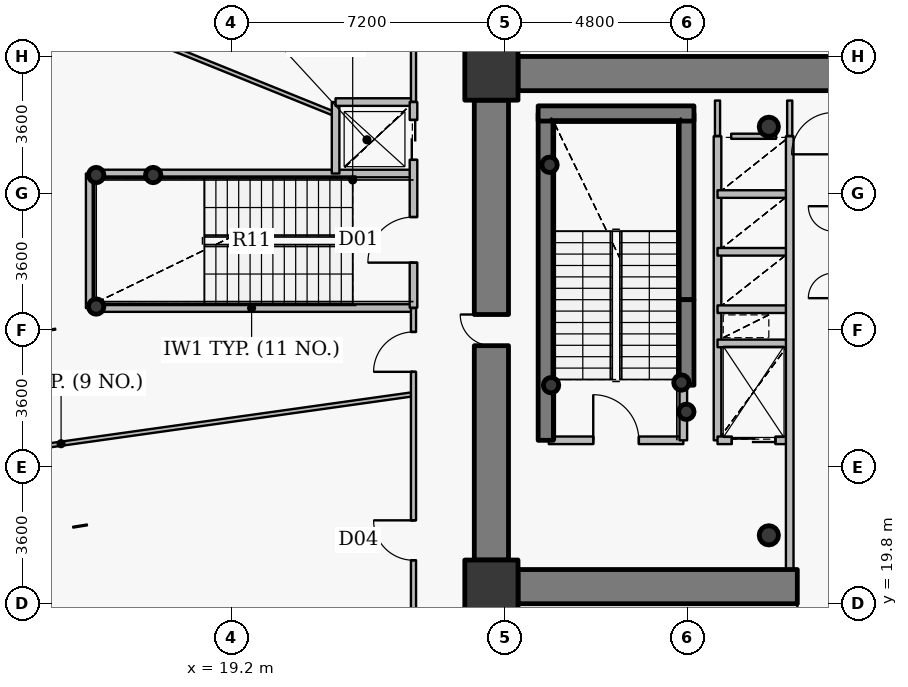
"""IFC4 building model, lengths in metres.
Left out: names, types, materials, properties, quantities, classifications, styles, units other than length and angle.
Written with IfcOpenShell. Run it as: python <this file> out.ifc"""

import sys

from ifc_helpers import new_model, si_unit, direction, frame, frame_2d, origin, origin_2d, place, context, subcontext, project, spatial, rectangle, hollow_circle, extrude, source, transform, mapped, element, fill, save


model = new_model("IFC4")
c1 = context("Model", 3, precision=1e-05, world=origin(), true_north=direction((0.0, 1.0)))
c2 = subcontext(c1, "Body", "Model", "MODEL_VIEW")
j1 = project(units=[si_unit("LENGTHUNIT", "METRE"), si_unit("PLANEANGLEUNIT", "RADIAN")], contexts=[c1])
p1 = place(None, origin())
s1 = spatial("IfcSite", under=j1, at=p1, CompositionType="ELEMENT")
p2 = place(p1, origin())
s2 = spatial("IfcBuilding", under=s1, at=p2, CompositionType="ELEMENT")
p3 = place(p2, frame((0.0, 0.0, 49.2)))
s3 = spatial("IfcBuildingStorey", under=s2, at=p3, CompositionType="ELEMENT", Elevation=49.2)
for number, where, z_axis, x_axis in (
    (1, (26.05, 20.25, 0.0), (0.0, 0.0, 1.0), (1.0, 0.0, 0.0)),
    (2, (26.05, 33.75, 0.0), (0.0, 0.0, 1.0), (1.0, 0.0, 0.0)),
):
    element("IfcColumn", number, at=place(p3, frame(where, z_axis=z_axis, x_axis=x_axis)), inside=s3, PredefinedType="COLUMN", context=c2, shape_type="SweptSolid", body=[
        extrude(rectangle(XDim=1.4, YDim=1.4, at=origin_2d()), origin(), (0.0, 0.0, 1.0), 4.2),
    ])
for number, where, z_axis, x_axis in (
    (3, (33.35, 21.6, 0.0), (0.0, 0.0, 1.0), (1.0, 0.0, 0.0)),
    (4, (33.35, 32.35, 0.0), (0.0, 0.0, 1.0), (1.0, 0.0, 0.0)),
):
    element("IfcColumn", number, at=place(p3, frame(where, z_axis=z_axis, x_axis=x_axis)), inside=s3, PredefinedType="COLUMN", context=c2, shape_type="SweptSolid", body=[
        extrude(hollow_circle(Radius=0.254, WallThickness=0.02, at=origin_2d()), origin(), (0.0, 0.0, 1.0), 4.2),
    ])
p4 = place(p3, frame((27.48, 24.1, 0.0), z_axis=(0.0, 0.0, 1.0), x_axis=(0.0, 1.0, 0.0)))
e5 = element("IfcWall", 5, at=p4, inside=s3, PredefinedType="SHEAR", context=c2, shape_type="SweptSolid", body=[
    extrude(rectangle(XDim=8.6, YDim=0.4, at=frame_2d((4.3, 0.0))), origin(), (0.0, 0.0, 1.0), 4.2),
])
p5 = place(p3, frame((31.18, 27.8, 0.0), z_axis=(0.0, 0.0, 1.0), x_axis=(0.0, 1.0, 0.0)))
e6 = element("IfcWall", 6, at=p5, inside=s3, PredefinedType="SHEAR", context=c2, shape_type="SweptSolid", body=[
    extrude(rectangle(XDim=4.9, YDim=0.4, at=frame_2d((2.45, 0.0))), origin(), (0.0, 0.0, 1.0), 4.2),
])
p6 = place(p3, frame((27.28, 32.7, 0.0), z_axis=(0.0, 0.0, 1.0), x_axis=(1.0, 0.0, 0.0)))
e7 = element("IfcWall", 7, at=p6, inside=s3, PredefinedType="SHEAR", context=c2, shape_type="SweptSolid", body=[
    extrude(rectangle(XDim=4.1, YDim=0.4, at=frame_2d((2.05, 0.0))), origin(), (0.0, 0.0, 1.0), 4.2),
])
for number, where, z_axis, x_axis in (
    (8, (27.58, 31.35, 0.0), (0.0, 0.0, 1.0), (1.0, 0.0, 0.0)),
    (9, (31.05, 25.62, 0.0), (0.0, 0.0, 1.0), (1.0, 0.0, 0.0)),
    (10, (31.18, 24.85, 0.0), (0.0, 0.0, 1.0), (1.0, 0.0, 0.0)),
    (11, (27.62, 25.55, 0.0), (0.0, 0.0, 1.0), (1.0, 0.0, 0.0)),
    (12, (15.65, 27.62, 0.0), (0.0, 0.0, 1.0), (1.0, 0.0, 0.0)),
    (13, (15.65, 31.08, 0.0), (0.0, 0.0, 1.0), (1.0, 0.0, 0.0)),
    (14, (17.15, 31.08, 0.0), (0.0, 0.0, 1.0), (1.0, 0.0, 0.0)),
):
    element("IfcColumn", number, at=place(p3, frame(where, z_axis=z_axis, x_axis=x_axis)), inside=s3, PredefinedType="COLUMN", context=c2, shape_type="SweptSolid", body=[
        extrude(hollow_circle(Radius=0.203, WallThickness=0.016, at=origin_2d()), origin(), (0.0, 0.0, 1.0), 4.2),
    ])
p7 = place(p3, frame((26.75, 33.75, 0.0), z_axis=(0.0, 0.0, 1.0), x_axis=(1.0, 0.0, 0.0)))
e15 = element("IfcWall", 15, at=p7, inside=s3, PredefinedType="SHEAR", context=c2, shape_type="SweptSolid", body=[
    extrude(rectangle(XDim=18.5, YDim=0.9, at=frame_2d((9.25, 0.0))), origin(), (0.0, 0.0, 1.0), 3.4),
])
p8 = place(p3, frame((45.25, 20.25, 0.0), z_axis=(0.0, 0.0, 1.0), x_axis=(-1.0, 0.0, 0.0)))
e16 = element("IfcWall", 16, at=p8, inside=s3, PredefinedType="SHEAR", context=c2, shape_type="SweptSolid", body=[
    extrude(rectangle(XDim=18.5, YDim=0.9, at=frame_2d((9.25, 0.0))), origin(), (0.0, 0.0, 1.0), 3.4),
])
p9 = place(p8, frame((10.0, 0.0, 0.0)))
e17 = element("IfcOpeningElement", 17, at=p9, cuts=e16, PredefinedType="OPENING", context=c2, shape_type="SweptSolid", body=[
    extrude(rectangle(XDim=1.15, YDim=2.15, at=origin_2d()), frame((0.575, 0.46, 1.075), z_axis=(0.0, -1.0, 0.0), x_axis=(1.0, 0.0, 0.0)), (0.0, 0.0, 1.0), 0.92),
])
p10 = place(p3, frame((26.05, 20.95, 0.0), z_axis=(0.0, 0.0, 1.0), x_axis=(0.0, 1.0, 0.0)))
e18 = element("IfcWall", 18, at=p10, inside=s3, PredefinedType="SHEAR", context=c2, shape_type="SweptSolid", body=[
    extrude(rectangle(XDim=12.1, YDim=0.9, at=frame_2d((6.05, 0.0))), origin(), (0.0, 0.0, 1.0), 3.4),
])
p11 = place(p10, frame((5.64, 0.0, 0.0)))
e19 = element("IfcOpeningElement", 19, at=p11, cuts=e18, PredefinedType="OPENING", context=c2, shape_type="SweptSolid", body=[
    extrude(rectangle(XDim=0.82, YDim=2.1, at=origin_2d()), frame((0.41, 0.46, 1.05), z_axis=(0.0, -1.0, 0.0), x_axis=(1.0, 0.0, 0.0)), (0.0, 0.0, 1.0), 0.92),
])
p12 = place(p3, frame((31.18, 25.55, 0.0), z_axis=(0.0, 0.0, 1.0), x_axis=(0.0, 1.0, 0.0)))
e20 = element("IfcWall", 20, at=p12, inside=s3, PredefinedType="SHEAR", context=c2, shape_type="SweptSolid", body=[
    extrude(rectangle(XDim=2.25, YDim=0.4, at=frame_2d((1.125, 0.0))), origin(), (0.0, 0.0, 1.0), 3.55),
])
p13 = place(p3, frame((5.454, 22.707, 0.0), z_axis=(0.0, 0.0, 1.0), x_axis=(0.990268652703, 0.139168945795, 0.0)))
e21 = element("IfcWall", 21, at=p13, inside=s3, PredefinedType="MOVABLE", context=c2, shape_type="SweptSolid", body=[
    extrude(rectangle(XDim=18.729, YDim=0.11, at=frame_2d((9.364, 0.0))), origin(), (0.0, 0.0, 1.0), 3.335),
])
p14 = place(p3, frame((8.4, 38.151, 0.0), z_axis=(0.0, 0.0, 1.0), x_axis=(0.927179581649, -0.374617169084, 0.0)))
e22 = element("IfcWall", 22, at=p14, inside=s3, PredefinedType="MOVABLE", context=c2, shape_type="SweptSolid", body=[
    extrude(rectangle(XDim=14.615, YDim=0.11, at=frame_2d((7.307, 0.0))), origin(), (0.0, 0.0, 1.0), 3.285),
])
p15 = place(p3, frame((15.48, 27.58, 0.0), z_axis=(0.0, 0.0, 1.0), x_axis=(0.0, 1.0, 0.0)))
e23 = element("IfcWall", 23, at=p15, inside=s3, PredefinedType="PARTITIONING", context=c2, shape_type="SweptSolid", body=[
    extrude(rectangle(XDim=3.54, YDim=0.2, at=frame_2d((1.77, 0.0))), origin(), (0.0, 0.0, 1.0), 3.95),
])
for number, where, z_axis, x_axis in (
    (24, (15.48, 27.58, 0.0), (0.0, 0.0, 1.0), (1.0, 0.0, 0.0)),
    (25, (15.48, 31.12, 0.0), (0.0, 0.0, 1.0), (1.0, 0.0, 0.0)),
):
    element("IfcWall", number, at=place(p3, frame(where, z_axis=z_axis, x_axis=x_axis)), inside=s3, PredefinedType="PARTITIONING", context=c2, shape_type="SweptSolid", body=[
        extrude(rectangle(XDim=8.52, YDim=0.2, at=frame_2d((4.26, 0.0))), origin(), (0.0, 0.0, 1.0), 3.95),
    ])
p16 = place(p3, frame((21.95, 31.12, 0.0), z_axis=(0.0, 0.0, 1.0), x_axis=(0.0, 1.0, 0.0)))
e26 = element("IfcWall", 26, at=p16, inside=s3, PredefinedType="PARTITIONING", context=c2, shape_type="SweptSolid", body=[
    extrude(rectangle(XDim=1.88, YDim=0.2, at=frame_2d((0.94, 0.0))), origin(), (0.0, 0.0, 1.0), 3.285),
])
p17 = place(p3, frame((21.95, 33.0, 0.0), z_axis=(0.0, 0.0, 1.0), x_axis=(1.0, 0.0, 0.0)))
e27 = element("IfcWall", 27, at=p17, inside=s3, PredefinedType="PARTITIONING", context=c2, shape_type="SweptSolid", body=[
    extrude(rectangle(XDim=2.05, YDim=0.2, at=frame_2d((1.025, 0.0))), origin(), (0.0, 0.0, 1.0), 3.95),
])
p18 = place(p3, frame((24.0, 14.8, 0.0), z_axis=(0.0, 0.0, 1.0), x_axis=(0.0, 1.0, 0.0)))
e28 = element("IfcWall", 28, at=p18, inside=s3, PredefinedType="PARTITIONING", context=c2, shape_type="SweptSolid", body=[
    extrude(rectangle(XDim=12.78, YDim=0.135, at=frame_2d((6.39, 0.0))), origin(), (0.0, 0.0, 1.0), 3.285),
])
p19 = place(p18, frame((11.102, 0.0, 0.0)))
e29 = element("IfcOpeningElement", 29, at=p19, cuts=e28, PredefinedType="OPENING", context=c2, shape_type="SweptSolid", body=[
    extrude(rectangle(XDim=1.05, YDim=2.15, at=origin_2d()), frame((0.525, 0.078, 1.075), z_axis=(0.0, -1.0, 0.0), x_axis=(1.0, 0.0, 0.0)), (0.0, 0.0, 1.0), 0.155),
])
p20 = place(p18, frame((6.144, 0.0, 0.0)))
e30 = element("IfcOpeningElement", 30, at=p20, cuts=e28, PredefinedType="OPENING", context=c2, shape_type="SweptSolid", body=[
    extrude(rectangle(XDim=1.05, YDim=2.15, at=origin_2d()), frame((0.525, 0.078, 1.075), z_axis=(0.0, -1.0, 0.0), x_axis=(1.0, 0.0, 0.0)), (0.0, 0.0, 1.0), 0.155),
])
p21 = place(p3, frame((24.0, 27.59, 0.0), z_axis=(0.0, 0.0, 1.0), x_axis=(0.0, 1.0, 0.0)))
e31 = element("IfcWall", 31, at=p21, inside=s3, PredefinedType="PARTITIONING", context=c2, shape_type="SweptSolid", body=[
    extrude(rectangle(XDim=5.41, YDim=0.2, at=frame_2d((2.705, 0.0))), origin(), (0.0, 0.0, 1.0), 3.285),
])
p22 = place(p21, frame((1.185, 0.0, 0.0)))
e32 = element("IfcOpeningElement", 32, at=p22, cuts=e31, PredefinedType="OPENING", context=c2, shape_type="SweptSolid", body=[
    extrude(rectangle(XDim=1.2, YDim=2.15, at=origin_2d()), frame((0.6, 0.11, 1.075), z_axis=(0.0, -1.0, 0.0), x_axis=(1.0, 0.0, 0.0)), (0.0, 0.0, 1.0), 0.22),
])
p23 = place(p21, frame((3.89, 0.0, 0.0)))
e33 = element("IfcOpeningElement", 33, at=p23, cuts=e31, PredefinedType="OPENING", context=c2, shape_type="SweptSolid", body=[
    extrude(rectangle(XDim=1.05, YDim=2.15, at=origin_2d()), frame((0.525, 0.11, 1.075), z_axis=(0.0, -1.0, 0.0), x_axis=(1.0, 0.0, 0.0)), (0.0, 0.0, 1.0), 0.22),
])
p24 = place(p3, frame((24.0, 33.01, 0.0), z_axis=(0.0, 0.0, 1.0), x_axis=(0.0, 1.0, 0.0)))
e34 = element("IfcWall", 34, at=p24, inside=s3, PredefinedType="PARTITIONING", context=c2, shape_type="SweptSolid", body=[
    extrude(rectangle(XDim=8.19, YDim=0.135, at=frame_2d((4.095, 0.0))), origin(), (0.0, 0.0, 1.0), 3.285),
])
p25 = place(p24, frame((3.57, 0.0, 0.0)))
e35 = element("IfcOpeningElement", 35, at=p25, cuts=e34, PredefinedType="OPENING", context=c2, shape_type="SweptSolid", body=[
    extrude(rectangle(XDim=1.05, YDim=2.15, at=origin_2d()), frame((0.525, 0.078, 1.075), z_axis=(0.0, -1.0, 0.0), x_axis=(1.0, 0.0, 0.0)), (0.0, 0.0, 1.0), 0.155),
])
p26 = place(p3, frame((27.56, 24.1, 0.0), z_axis=(0.0, 0.0, 1.0), x_axis=(1.0, 0.0, 0.0)))
e36 = element("IfcWall", 36, at=p26, inside=s3, PredefinedType="PARTITIONING", context=c2, shape_type="SweptSolid", body=[
    extrude(rectangle(XDim=3.54, YDim=0.2, at=frame_2d((1.77, 0.0))), origin(), (0.0, 0.0, 1.0), 3.95),
])
p27 = place(p26, frame((1.17, 0.0, 0.0)))
e37 = element("IfcOpeningElement", 37, at=p27, cuts=e36, PredefinedType="OPENING", context=c2, shape_type="SweptSolid", body=[
    extrude(rectangle(XDim=1.2, YDim=2.15, at=origin_2d()), frame((0.6, 0.11, 1.075), z_axis=(0.0, -1.0, 0.0), x_axis=(1.0, 0.0, 0.0)), (0.0, 0.0, 1.0), 0.22),
])
p28 = place(p3, frame((31.1, 24.1, 0.0), z_axis=(0.0, 0.0, 1.0), x_axis=(0.0, 1.0, 0.0)))
e38 = element("IfcWall", 38, at=p28, inside=s3, PredefinedType="PARTITIONING", context=c2, shape_type="SweptSolid", body=[
    extrude(rectangle(XDim=1.44, YDim=0.2, at=frame_2d((0.72, 0.0))), origin(), (0.0, 0.0, 1.0), 3.95),
])
p29 = place(p3, frame((32.0, 24.1, 0.0), z_axis=(0.0, 0.0, 1.0), x_axis=(0.0, 1.0, 0.0)))
e39 = element("IfcWall", 39, at=p29, inside=s3, PredefinedType="PARTITIONING", context=c2, shape_type="SweptSolid", body=[
    extrude(rectangle(XDim=8.0, YDim=0.2, at=frame_2d((4.0, 0.0))), origin(), (0.0, 0.0, 1.0), 3.95),
])
p30 = place(p3, frame((32.0, 24.1, 0.0), z_axis=(0.0, 0.0, 1.0), x_axis=(1.0, 0.0, 0.0)))
e40 = element("IfcWall", 40, at=p30, inside=s3, PredefinedType="PARTITIONING", context=c2, shape_type="SweptSolid", body=[
    extrude(rectangle(XDim=1.9, YDim=0.2, at=frame_2d((0.95, 0.0))), origin(), (0.0, 0.0, 1.0), 3.535),
])
p31 = place(p30, frame((0.375, 0.0, 0.0)))
e41 = element("IfcOpeningElement", 41, at=p31, cuts=e40, PredefinedType="OPENING", context=c2, shape_type="SweptSolid", body=[
    extrude(rectangle(XDim=1.15, YDim=2.15, at=origin_2d()), frame((0.575, 0.11, 1.075), z_axis=(0.0, -1.0, 0.0), x_axis=(1.0, 0.0, 0.0)), (0.0, 0.0, 1.0), 0.22),
])
for number, where, z_axis, x_axis in (
    (42, (32.0, 26.65, 0.0), (0.0, 0.0, 1.0), (1.0, 0.0, 0.0)),
    (43, (32.0, 27.55, 0.0), (0.0, 0.0, 1.0), (1.0, 0.0, 0.0)),
    (44, (32.0, 29.06, 0.0), (0.0, 0.0, 1.0), (1.0, 0.0, 0.0)),
    (45, (32.0, 30.58, 0.0), (0.0, 0.0, 1.0), (1.0, 0.0, 0.0)),
):
    element("IfcWall", number, at=place(p3, frame(where, z_axis=z_axis, x_axis=x_axis)), inside=s3, PredefinedType="PARTITIONING", context=c2, shape_type="SweptSolid", body=[
        extrude(rectangle(XDim=1.9, YDim=0.2, at=frame_2d((0.95, 0.0))), origin(), (0.0, 0.0, 1.0), 3.535),
    ])
p32 = place(p3, frame((33.9, 20.7, 0.0), z_axis=(0.0, 0.0, 1.0), x_axis=(0.0, 1.0, 0.0)))
e46 = element("IfcWall", 46, at=p32, inside=s3, PredefinedType="PARTITIONING", context=c2, shape_type="SweptSolid", body=[
    extrude(rectangle(XDim=11.4, YDim=0.2, at=frame_2d((5.7, 0.0))), origin(), (0.0, 0.0, 1.0), 3.535),
])
p33 = place(p3, frame((32.36, 32.1, 0.0), z_axis=(0.0, 0.0, 1.0), x_axis=(1.0, 0.0, 0.0)))
e47 = element("IfcWall", 47, at=p33, inside=s3, PredefinedType="PARTITIONING", context=c2, shape_type="SweptSolid", body=[
    extrude(rectangle(XDim=1.18, YDim=0.135, at=frame_2d((0.59, 0.0))), origin(), (0.0, 0.0, 1.0), 3.535),
])
p34 = place(p3, frame((32.0, 33.04, 0.0), z_axis=(0.0, 0.0, 1.0), x_axis=(0.0, -1.0, 0.0)))
e48 = element("IfcWall", 48, at=p34, inside=s3, PredefinedType="PARTITIONING", context=c2, shape_type="SweptSolid", body=[
    extrude(rectangle(XDim=0.93, YDim=0.135, at=frame_2d((0.465, 0.0))), origin(), (0.0, 0.0, 1.0), 3.485),
])
p35 = place(p3, frame((33.9, 32.11, 0.0), z_axis=(0.0, 0.0, 1.0), x_axis=(0.0, 1.0, 0.0)))
e49 = element("IfcWall", 49, at=p35, inside=s3, PredefinedType="PARTITIONING", context=c2, shape_type="SweptSolid", body=[
    extrude(rectangle(XDim=0.93, YDim=0.135, at=frame_2d((0.465, 0.0))), origin(), (0.0, 0.0, 1.0), 3.535),
])
p36 = place(p3, frame((25.95, 38.893, 0.0), z_axis=(0.0, 0.0, 1.0), x_axis=(0.0, -1.0, 0.0)))
e50 = element("IfcWall", 50, at=p36, inside=s3, PredefinedType="PARTITIONING", context=c2, shape_type="SweptSolid", body=[
    extrude(rectangle(XDim=4.693, YDim=0.135, at=frame_2d((2.346, 0.0))), origin(), (0.0, 0.0, 1.0), 3.285),
])
for number, where, z_axis, x_axis in (
    (51, (25.6, 34.2, 0.0), (0.0, 0.0, 1.0), (0.0, -1.0, 0.0)),
    (52, (25.6, 20.94, 0.0), (0.0, 0.0, 1.0), (0.0, -1.0, 0.0)),
):
    element("IfcWall", number, at=place(p3, frame(where, z_axis=z_axis, x_axis=x_axis)), inside=s3, PredefinedType="PARTITIONING", context=c2, shape_type="SweptSolid", body=[
        extrude(rectangle(XDim=1.14, YDim=0.135, at=frame_2d((0.57, 0.0))), origin(), (0.0, 0.0, 1.0), 3.95),
    ])
p37 = place(p3, frame((25.907, 19.8, 0.0), z_axis=(0.0, 0.0, 1.0), x_axis=(1.0, 0.0, 0.0)))
e53 = element("IfcWall", 53, at=p37, inside=s3, PredefinedType="PARTITIONING", context=c2, shape_type="SweptSolid", body=[
    extrude(rectangle(XDim=0.833, YDim=0.135, at=frame_2d((0.416, 0.0))), origin(), (0.0, 0.0, 1.0), 3.285),
])
m1 = source(origin(), c2, "Body", "SweptSolid", [
    extrude(rectangle(XDim=0.82, YDim=2.1, at=origin_2d()), frame((0.41, 0.025, 1.05), z_axis=(0.0, -1.0, 0.0), x_axis=(1.0, 0.0, 0.0)), (0.0, 0.0, 1.0), 0.05),
])
p38 = place(p11, origin())
e54 = element("IfcDoor", 54, at=p38, inside=s3, OperationType="SINGLE_SWING_RIGHT", PredefinedType="DOOR", context=c2, shape_type="MappedRepresentation", body=[
    mapped(m1, transform((0.0, 0.0, 0.0), x_axis=(1.0, 0.0, 0.0), y_axis=(0.0, 1.0, 0.0), z_axis=(0.0, 0.0, 1.0), scale=1.0)),
])
fill(e19, e54)
m2 = source(origin(), c2, "Body", "SweptSolid", [
    extrude(rectangle(XDim=1.15, YDim=2.15, at=origin_2d()), frame((0.575, 0.025, 1.075), z_axis=(0.0, -1.0, 0.0), x_axis=(1.0, 0.0, 0.0)), (0.0, 0.0, 1.0), 0.05),
])
p39 = place(p9, origin())
e55 = element("IfcDoor", 55, at=p39, inside=s3, OperationType="SINGLE_SWING_RIGHT", PredefinedType="DOOR", context=c2, shape_type="MappedRepresentation", body=[
    mapped(m2, transform((0.0, 0.0, 0.0), x_axis=(1.0, 0.0, 0.0), y_axis=(0.0, 1.0, 0.0), z_axis=(0.0, 0.0, 1.0), scale=1.0)),
])
fill(e17, e55)
m3 = source(origin(), c2, "Body", "SweptSolid", [
    extrude(rectangle(XDim=1.2, YDim=2.15, at=origin_2d()), frame((0.6, 0.025, 1.075), z_axis=(0.0, -1.0, 0.0), x_axis=(1.0, 0.0, 0.0)), (0.0, 0.0, 1.0), 0.05),
])
p40 = place(p27, origin())
e56 = element("IfcDoor", 56, at=p40, inside=s3, OperationType="SINGLE_SWING_LEFT", PredefinedType="DOOR", context=c2, shape_type="MappedRepresentation", body=[
    mapped(m3, transform((0.0, 0.0, 0.0), x_axis=(1.0, 0.0, 0.0), y_axis=(0.0, 1.0, 0.0), z_axis=(0.0, 0.0, 1.0), scale=1.0)),
])
fill(e37, e56)
p41 = place(p22, origin())
e57 = element("IfcDoor", 57, at=p41, inside=s3, OperationType="SINGLE_SWING_LEFT", PredefinedType="DOOR", context=c2, shape_type="MappedRepresentation", body=[
    mapped(m3, transform((0.0, 0.0, 0.0), x_axis=(1.0, 0.0, 0.0), y_axis=(0.0, 1.0, 0.0), z_axis=(0.0, 0.0, 1.0), scale=1.0)),
])
fill(e32, e57)
m4 = source(origin(), c2, "Body", "SweptSolid", [
    extrude(rectangle(XDim=1.15, YDim=2.15, at=origin_2d()), frame((0.575, 0.025, 1.075), z_axis=(0.0, -1.0, 0.0), x_axis=(1.0, 0.0, 0.0)), (0.0, 0.0, 1.0), 0.05),
])
p42 = place(p31, origin())
e58 = element("IfcDoor", 58, at=p42, inside=s3, OperationType="DOUBLE_DOOR_SLIDING", PredefinedType="USERDEFINED", context=c2, shape_type="MappedRepresentation", body=[
    mapped(m4, transform((0.0, 0.0, 0.0), x_axis=(1.0, 0.0, 0.0), y_axis=(0.0, 1.0, 0.0), z_axis=(0.0, 0.0, 1.0), scale=1.0)),
])
fill(e41, e58)
m5 = source(origin(), c2, "Body", "SweptSolid", [
    extrude(rectangle(XDim=1.05, YDim=2.15, at=origin_2d()), frame((0.525, 0.025, 1.075), z_axis=(0.0, -1.0, 0.0), x_axis=(1.0, 0.0, 0.0)), (0.0, 0.0, 1.0), 0.05),
])
p43 = place(p23, origin())
e59 = element("IfcDoor", 59, at=p43, inside=s3, OperationType="DOUBLE_DOOR_SLIDING", PredefinedType="USERDEFINED", context=c2, shape_type="MappedRepresentation", body=[
    mapped(m5, transform((0.0, 0.0, 0.0), x_axis=(1.0, 0.0, 0.0), y_axis=(0.0, 1.0, 0.0), z_axis=(0.0, 0.0, 1.0), scale=1.0)),
])
fill(e33, e59)
m6 = source(origin(), c2, "Body", "SweptSolid", [
    extrude(rectangle(XDim=1.05, YDim=2.15, at=origin_2d()), frame((0.525, 0.025, 1.075), z_axis=(0.0, -1.0, 0.0), x_axis=(1.0, 0.0, 0.0)), (0.0, 0.0, 1.0), 0.05),
])
p44 = place(p19, origin())
e60 = element("IfcDoor", 60, at=p44, inside=s3, OperationType="SINGLE_SWING_LEFT", PredefinedType="DOOR", context=c2, shape_type="MappedRepresentation", body=[
    mapped(m6, transform((0.0, 0.0, 0.0), x_axis=(1.0, 0.0, 0.0), y_axis=(0.0, 1.0, 0.0), z_axis=(0.0, 0.0, 1.0), scale=1.0)),
])
fill(e29, e60)
p45 = place(p20, origin())
e61 = element("IfcDoor", 61, at=p45, inside=s3, OperationType="SINGLE_SWING_RIGHT", PredefinedType="DOOR", context=c2, shape_type="MappedRepresentation", body=[
    mapped(m6, transform((0.0, 0.0, 0.0), x_axis=(1.0, 0.0, 0.0), y_axis=(0.0, 1.0, 0.0), z_axis=(0.0, 0.0, 1.0), scale=1.0)),
])
fill(e30, e61)
save(model, sys.argv[1])
